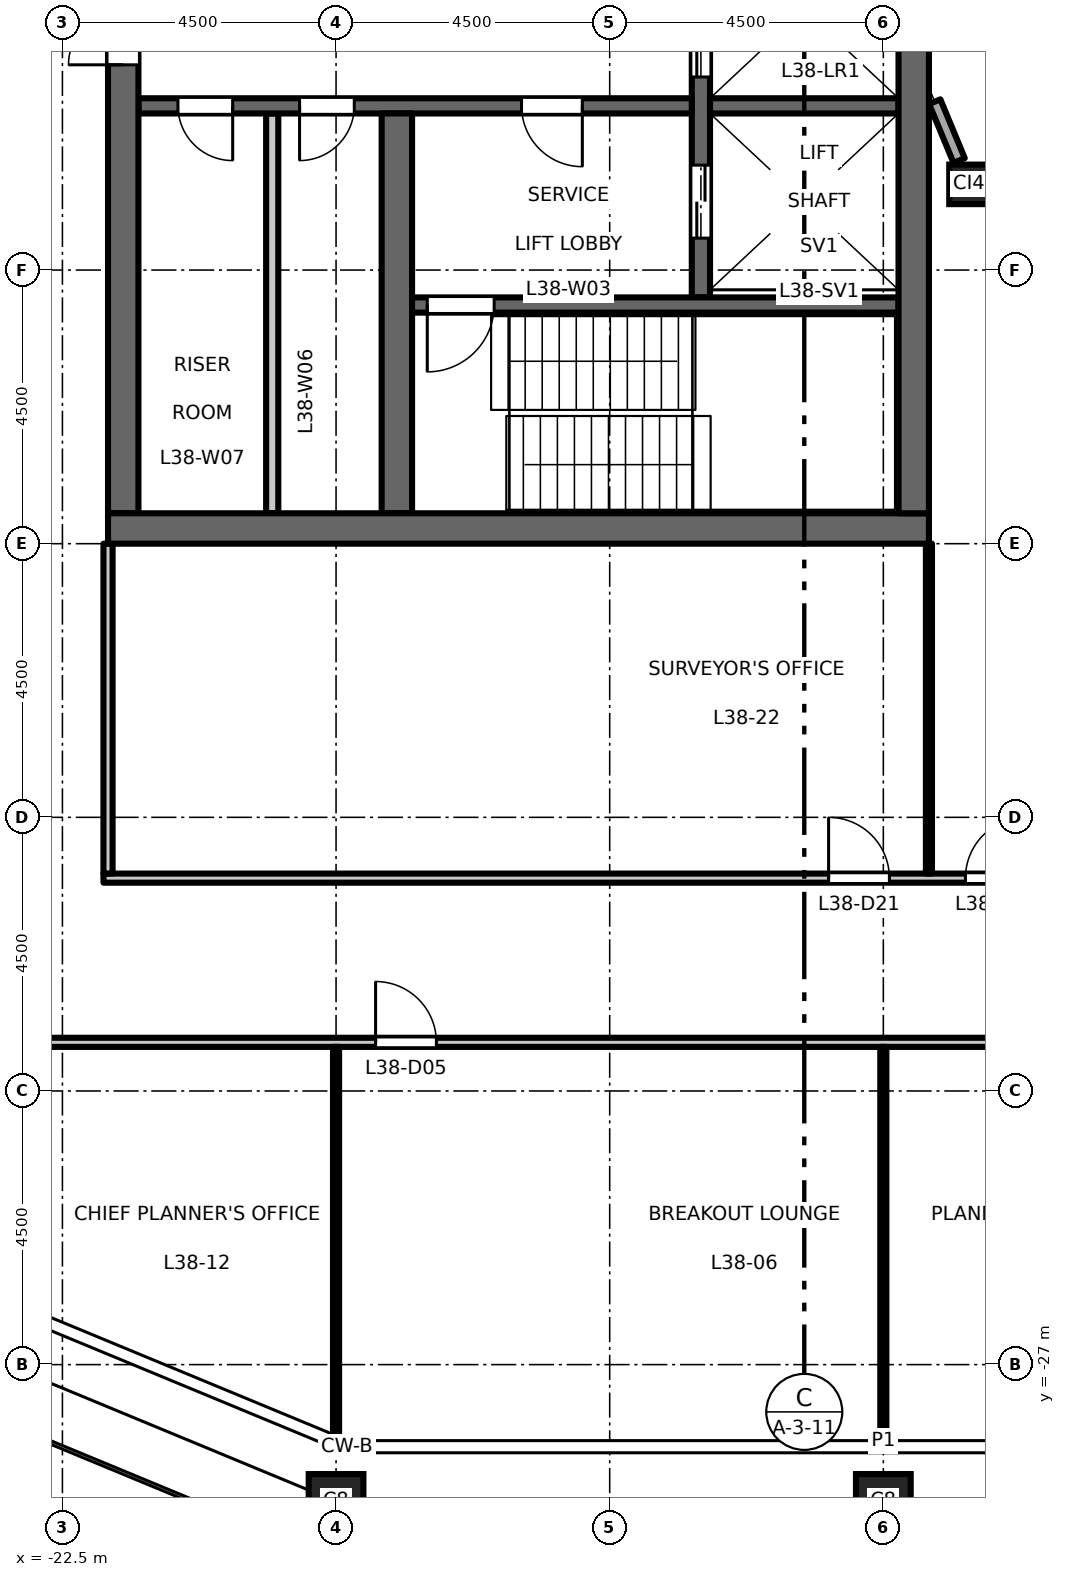
"""IFC4 building model, lengths in metres.
Left out: names, types, materials, properties, quantities, classifications, styles, units other than length and angle.
Written with IfcOpenShell. Run it as: python <this file> out.ifc"""

import sys

from ifc_helpers import new_model, si_unit, direction, frame, frame_2d, origin, origin_2d, place, context, subcontext, project, spatial, rectangle, hollow_rectangle, extrude, element, fill, save


model = new_model("IFC4")
c1 = context("Model", 3, precision=1e-05, world=origin(), true_north=direction((0.0, 1.0)))
c2 = subcontext(c1, "Body", "Model", "MODEL_VIEW")
j1 = project(units=[si_unit("LENGTHUNIT", "METRE"), si_unit("PLANEANGLEUNIT", "RADIAN")], contexts=[c1])
p1 = place(None, origin())
s1 = spatial("IfcSite", under=j1, at=p1, CompositionType="ELEMENT")
p2 = place(p1, origin())
s2 = spatial("IfcBuilding", under=s1, at=p2, CompositionType="ELEMENT")
p3 = place(p2, frame((0.0, 0.0, 176.7)))
s3 = spatial("IfcBuildingStorey", under=s2, at=p3, CompositionType="ELEMENT", Elevation=176.7)
for number, where, z_axis, x_axis in (
    (1, (-18.0, -29.25, 0.0), (0.0, 0.0, 1.0), (1.0, 0.0, 0.0)),
    (2, (-9.0, -29.25, 0.0), (0.0, 0.0, 1.0), (1.0, 0.0, 0.0)),
):
    element("IfcColumn", number, at=place(p3, frame(where, z_axis=z_axis, x_axis=x_axis)), inside=s3, PredefinedType="COLUMN", context=c2, shape_type="SweptSolid", body=[
        extrude(hollow_rectangle(XDim=0.9, YDim=0.9, WallThickness=0.05, at=origin_2d()), origin(), (0.0, 0.0, 1.0), 4.5),
    ])
p4 = place(p3, frame((-7.591, -7.591, 0.0), z_axis=(0.0, 0.0, 1.0), x_axis=(1.0, 0.0, 0.0)))
e3 = element("IfcColumn", 3, at=p4, inside=s3, PredefinedType="COLUMN", context=c2, shape_type="SweptSolid", body=[
    extrude(hollow_rectangle(XDim=0.65, YDim=0.65, WallThickness=0.036, at=origin_2d()), origin(), (0.0, 0.0, 1.0), 4.5),
])
p5 = place(p3, frame((-12.0, -9.45, 0.0), z_axis=(0.0, 0.0, 1.0), x_axis=(0.0, 1.0, 0.0)))
e4 = element("IfcWall", 4, at=p5, inside=s3, PredefinedType="SHEAR", context=c2, shape_type="SweptSolid", body=[
    extrude(rectangle(XDim=18.9, YDim=0.3, at=frame_2d((9.45, 0.0))), origin(), (0.0, 0.0, 1.0), 4.3),
])
p6 = place(p5, frame((3.625, 0.0, 0.0)))
e5 = element("IfcOpeningElement", 5, at=p6, cuts=e4, PredefinedType="OPENING", context=c2, shape_type="SweptSolid", body=[
    extrude(rectangle(XDim=1.1, YDim=2.1, at=frame_2d((0.55, 1.05))), frame((0.0, 0.16, 0.0), z_axis=(0.0, -1.0, 0.0), x_axis=(1.0, 0.0, 0.0)), (0.0, 0.0, 1.0), 0.32),
])
p7 = place(p5, frame((6.775, 0.0, 0.0)))
e6 = element("IfcOpeningElement", 6, at=p7, cuts=e4, PredefinedType="OPENING", context=c2, shape_type="SweptSolid", body=[
    extrude(rectangle(XDim=1.1, YDim=2.1, at=frame_2d((0.55, 1.05))), frame((0.0, 0.16, 0.0), z_axis=(0.0, -1.0, 0.0), x_axis=(1.0, 0.0, 0.0)), (0.0, 0.0, 1.0), 0.32),
])
p8 = place(p5, frame((9.925, 0.0, 0.0)))
e7 = element("IfcOpeningElement", 7, at=p8, cuts=e4, PredefinedType="OPENING", context=c2, shape_type="SweptSolid", body=[
    extrude(rectangle(XDim=1.1, YDim=2.1, at=frame_2d((0.55, 1.05))), frame((0.0, 0.16, 0.0), z_axis=(0.0, -1.0, 0.0), x_axis=(1.0, 0.0, 0.0)), (0.0, 0.0, 1.0), 0.32),
])
p9 = place(p5, frame((13.075, 0.0, 0.0)))
e8 = element("IfcOpeningElement", 8, at=p9, cuts=e4, PredefinedType="OPENING", context=c2, shape_type="SweptSolid", body=[
    extrude(rectangle(XDim=1.1, YDim=2.1, at=frame_2d((0.55, 1.05))), frame((0.0, 0.16, 0.0), z_axis=(0.0, -1.0, 0.0), x_axis=(1.0, 0.0, 0.0)), (0.0, 0.0, 1.0), 0.32),
])
p10 = place(p5, frame((16.725, 0.0, 0.0)))
e9 = element("IfcOpeningElement", 9, at=p10, cuts=e4, PredefinedType="OPENING", context=c2, shape_type="SweptSolid", body=[
    extrude(rectangle(XDim=1.2, YDim=2.1, at=frame_2d((0.6, 1.05))), frame((0.0, 0.16, 0.0), z_axis=(0.0, -1.0, 0.0), x_axis=(1.0, 0.0, 0.0)), (0.0, 0.0, 1.0), 0.32),
])
p11 = place(p5, frame((0.975, 0.0, 0.0)))
e10 = element("IfcOpeningElement", 10, at=p11, cuts=e4, PredefinedType="OPENING", context=c2, shape_type="SweptSolid", body=[
    extrude(rectangle(XDim=1.2, YDim=2.1, at=frame_2d((0.6, 1.05))), frame((0.0, 0.16, 0.0), z_axis=(0.0, -1.0, 0.0), x_axis=(1.0, 0.0, 0.0)), (0.0, 0.0, 1.0), 0.32),
])
p12 = place(p3, frame((-12.15, -6.3, 0.0), z_axis=(0.0, 0.0, 1.0), x_axis=(-1.0, 0.0, 0.0)))
e11 = element("IfcWall", 11, at=p12, inside=s3, PredefinedType="SHEAR", context=c2, shape_type="SweptSolid", body=[
    extrude(rectangle(XDim=9.1, YDim=0.25, at=frame_2d((4.55, 0.0))), origin(), (0.0, 0.0, 1.0), 4.3),
])
p13 = place(p12, frame((1.8, 0.0, 0.0)))
e12 = element("IfcOpeningElement", 12, at=p13, cuts=e11, PredefinedType="OPENING", context=c2, shape_type="SweptSolid", body=[
    extrude(rectangle(XDim=1.0, YDim=2.1, at=frame_2d((0.5, 1.05))), frame((0.0, 0.135, 0.0), z_axis=(0.0, -1.0, 0.0), x_axis=(1.0, 0.0, 0.0)), (0.0, 0.0, 1.0), 0.27),
])
p14 = place(p12, frame((5.55, 0.0, 0.0)))
e13 = element("IfcOpeningElement", 13, at=p14, cuts=e11, PredefinedType="OPENING", context=c2, shape_type="SweptSolid", body=[
    extrude(rectangle(XDim=0.9, YDim=2.1, at=frame_2d((0.45, 1.05))), frame((0.0, 0.135, 0.0), z_axis=(0.0, -1.0, 0.0), x_axis=(1.0, 0.0, 0.0)), (0.0, 0.0, 1.0), 0.27),
])
p15 = place(p12, frame((7.55, 0.0, 0.0)))
e14 = element("IfcOpeningElement", 14, at=p15, cuts=e11, PredefinedType="OPENING", context=c2, shape_type="SweptSolid", body=[
    extrude(rectangle(XDim=0.9, YDim=2.1, at=frame_2d((0.45, 1.05))), frame((0.0, 0.135, 0.0), z_axis=(0.0, -1.0, 0.0), x_axis=(1.0, 0.0, 0.0)), (0.0, 0.0, 1.0), 0.27),
])
p16 = place(p3, frame((-21.5, -13.0, 0.0), z_axis=(0.0, 0.0, 1.0), x_axis=(0.0, 1.0, 0.0)))
e15 = element("IfcWall", 15, at=p16, inside=s3, PredefinedType="SHEAR", context=c2, shape_type="SweptSolid", body=[
    extrude(rectangle(XDim=26.0, YDim=0.5, at=frame_2d((13.0, 0.0))), origin(), (0.0, 0.0, 1.0), 4.3),
])
p17 = place(p16, frame((16.825, 0.0, 0.0)))
e16 = element("IfcOpeningElement", 16, at=p17, cuts=e15, PredefinedType="OPENING", context=c2, shape_type="SweptSolid", body=[
    extrude(rectangle(XDim=1.8, YDim=2.1, at=frame_2d((0.9, 1.05))), frame((0.0, 0.26, 0.0), z_axis=(0.0, -1.0, 0.0), x_axis=(1.0, 0.0, 0.0)), (0.0, 0.0, 1.0), 0.52),
])
p18 = place(p16, frame((7.375, 0.0, 0.0)))
e17 = element("IfcOpeningElement", 17, at=p18, cuts=e15, PredefinedType="OPENING", context=c2, shape_type="SweptSolid", body=[
    extrude(rectangle(XDim=1.8, YDim=2.1, at=frame_2d((0.9, 1.05))), frame((0.0, 0.26, 0.0), z_axis=(0.0, -1.0, 0.0), x_axis=(1.0, 0.0, 0.0)), (0.0, 0.0, 1.0), 0.52),
])
p19 = place(p16, frame((23.8, 0.0, 0.0)))
e18 = element("IfcOpeningElement", 18, at=p19, cuts=e15, PredefinedType="OPENING", context=c2, shape_type="SweptSolid", body=[
    extrude(rectangle(XDim=0.9, YDim=2.1, at=frame_2d((0.45, 1.05))), frame((0.0, 0.26, 0.0), z_axis=(0.0, -1.0, 0.0), x_axis=(1.0, 0.0, 0.0)), (0.0, 0.0, 1.0), 0.52),
])
p20 = place(p3, frame((-19.05, -13.0, 0.0), z_axis=(0.0, 0.0, 1.0), x_axis=(0.0, 1.0, 0.0)))
e19 = element("IfcWall", 19, at=p20, inside=s3, PredefinedType="PARTITIONING", context=c2, shape_type="SweptSolid", body=[
    extrude(rectangle(XDim=6.575, YDim=0.2, at=frame_2d((3.288, 0.0))), origin(), (0.0, 0.0, 1.0), 4.3),
])
p21 = place(p3, frame((-17.0, -13.0, 0.0), z_axis=(0.0, 0.0, 1.0), x_axis=(0.0, 1.0, 0.0)))
e20 = element("IfcWall", 20, at=p21, inside=s3, PredefinedType="SHEAR", context=c2, shape_type="SweptSolid", body=[
    extrude(rectangle(XDim=6.575, YDim=0.5, at=frame_2d((3.288, 0.0))), origin(), (0.0, 0.0, 1.0), 4.3),
])
p22 = place(p3, frame((-8.75, -6.3, 0.0), z_axis=(0.0, 0.0, 1.0), x_axis=(-1.0, 0.0, 0.0)))
e21 = element("IfcWall", 21, at=p22, inside=s3, PredefinedType="SHEAR", context=c2, shape_type="SweptSolid", body=[
    extrude(rectangle(XDim=3.1, YDim=0.25, at=frame_2d((1.55, 0.0))), origin(), (0.0, 0.0, 1.0), 4.3),
])
p23 = place(p3, frame((-8.75, -9.575, 0.0), z_axis=(0.0, 0.0, 1.0), x_axis=(-1.0, 0.0, 0.0)))
e22 = element("IfcWall", 22, at=p23, inside=s3, PredefinedType="SHEAR", context=c2, shape_type="SweptSolid", body=[
    extrude(rectangle(XDim=8.0, YDim=0.25, at=frame_2d((4.0, 0.0))), origin(), (0.0, 0.0, 1.0), 4.3),
])
p24 = place(p23, frame((6.65, 0.0, 0.0)))
e23 = element("IfcOpeningElement", 23, at=p24, cuts=e22, PredefinedType="OPENING", context=c2, shape_type="SweptSolid", body=[
    extrude(rectangle(XDim=1.1, YDim=2.1, at=frame_2d((0.55, 1.05))), frame((0.0, 0.135, 0.0), z_axis=(0.0, -1.0, 0.0), x_axis=(1.0, 0.0, 0.0)), (0.0, 0.0, 1.0), 0.27),
])
p25 = place(p3, frame((-8.25, -13.25, 0.0), z_axis=(0.0, 0.0, 1.0), x_axis=(-1.0, 0.0, 0.0)))
e24 = element("IfcWall", 24, at=p25, inside=s3, PredefinedType="SHEAR", context=c2, shape_type="SweptSolid", body=[
    extrude(rectangle(XDim=13.5, YDim=0.5, at=frame_2d((6.75, 0.0))), origin(), (0.0, 0.0, 1.0), 4.3),
])
p26 = place(p3, frame((-8.5, -13.0, 0.0), z_axis=(0.0, 0.0, 1.0), x_axis=(0.0, 1.0, 0.0)))
e25 = element("IfcWall", 25, at=p26, inside=s3, PredefinedType="SHEAR", context=c2, shape_type="SweptSolid", body=[
    extrude(rectangle(XDim=26.0, YDim=0.5, at=frame_2d((13.0, 0.0))), origin(), (0.0, 0.0, 1.0), 4.3),
])
p27 = place(p3, frame((-8.154, -6.231, 0.0), z_axis=(0.0, 0.0, 1.0), x_axis=(0.382694858887, -0.923874799408, 0.0)))
e26 = element("IfcWall", 26, at=p27, inside=s3, PredefinedType="STANDARD", context=c2, shape_type="SweptSolid", body=[
    extrude(rectangle(XDim=1.048, YDim=0.2, at=frame_2d((0.524, 0.0))), origin(), (0.0, 0.0, 1.0), 3.776),
])
p28 = place(p3, frame((-26.646, -21.7, 0.0), z_axis=(0.0, 0.0, 1.0), x_axis=(1.0, 0.0, 0.0)))
e27 = element("IfcWall", 27, at=p28, inside=s3, PredefinedType="PARTITIONING", context=c2, shape_type="SweptSolid", body=[
    extrude(rectangle(XDim=53.292, YDim=0.15, at=frame_2d((26.646, 0.0))), origin(), (0.0, 0.0, 1.0), 4.3),
])
p29 = place(p28, frame((9.296, 0.0, 0.0)))
e28 = element("IfcOpeningElement", 28, at=p29, cuts=e27, PredefinedType="OPENING", context=c2, shape_type="SweptSolid", body=[
    extrude(rectangle(XDim=1.0, YDim=2.1, at=frame_2d((0.5, 1.05))), frame((0.0, 0.085, 0.0), z_axis=(0.0, -1.0, 0.0), x_axis=(1.0, 0.0, 0.0)), (0.0, 0.0, 1.0), 0.17),
])
p30 = place(p28, frame((25.046, 0.0, 0.0)))
e29 = element("IfcOpeningElement", 29, at=p30, cuts=e27, PredefinedType="OPENING", context=c2, shape_type="SweptSolid", body=[
    extrude(rectangle(XDim=1.0, YDim=2.1, at=frame_2d((0.5, 1.05))), frame((0.0, 0.085, 0.0), z_axis=(0.0, -1.0, 0.0), x_axis=(1.0, 0.0, 0.0)), (0.0, 0.0, 1.0), 0.17),
])
p31 = place(p28, frame((27.296, 0.0, 0.0)))
e30 = element("IfcOpeningElement", 30, at=p31, cuts=e27, PredefinedType="OPENING", context=c2, shape_type="SweptSolid", body=[
    extrude(rectangle(XDim=1.0, YDim=2.1, at=frame_2d((0.5, 1.05))), frame((0.0, 0.085, 0.0), z_axis=(0.0, -1.0, 0.0), x_axis=(1.0, 0.0, 0.0)), (0.0, 0.0, 1.0), 0.17),
])
p32 = place(p28, frame((43.046, 0.0, 0.0)))
e31 = element("IfcOpeningElement", 31, at=p32, cuts=e27, PredefinedType="OPENING", context=c2, shape_type="SweptSolid", body=[
    extrude(rectangle(XDim=1.0, YDim=2.1, at=frame_2d((0.5, 1.05))), frame((0.0, 0.085, 0.0), z_axis=(0.0, -1.0, 0.0), x_axis=(1.0, 0.0, 0.0)), (0.0, 0.0, 1.0), 0.17),
])
p33 = place(p28, frame((0.65, 0.0, 0.0)))
e32 = element("IfcOpeningElement", 32, at=p33, cuts=e27, PredefinedType="OPENING", context=c2, shape_type="SweptSolid", body=[
    extrude(rectangle(XDim=1.0, YDim=2.1, at=frame_2d((0.5, 1.05))), frame((0.0, 0.085, 0.0), z_axis=(0.0, -1.0, 0.0), x_axis=(1.0, 0.0, 0.0)), (0.0, 0.0, 1.0), 0.17),
])
p34 = place(p28, frame((51.546, 0.0, 0.0)))
e33 = element("IfcOpeningElement", 33, at=p34, cuts=e27, PredefinedType="OPENING", context=c2, shape_type="SweptSolid", body=[
    extrude(rectangle(XDim=1.0, YDim=2.1, at=frame_2d((0.5, 1.05))), frame((0.0, 0.085, 0.0), z_axis=(0.0, -1.0, 0.0), x_axis=(1.0, 0.0, 0.0)), (0.0, 0.0, 1.0), 0.17),
])
p35 = place(p3, frame((-21.825, -19.0, 0.0), z_axis=(0.0, 0.0, 1.0), x_axis=(1.0, 0.0, 0.0)))
e34 = element("IfcWall", 34, at=p35, inside=s3, PredefinedType="PARTITIONING", context=c2, shape_type="SweptSolid", body=[
    extrude(rectangle(XDim=43.65, YDim=0.15, at=frame_2d((21.825, 0.0))), origin(), (0.0, 0.0, 1.0), 4.3),
])
p36 = place(p35, frame((14.175, 0.0, 0.0)))
e35 = element("IfcOpeningElement", 35, at=p36, cuts=e34, PredefinedType="OPENING", context=c2, shape_type="SweptSolid", body=[
    extrude(rectangle(XDim=1.0, YDim=2.1, at=frame_2d((0.5, 1.05))), frame((0.0, 0.085, 0.0), z_axis=(0.0, -1.0, 0.0), x_axis=(1.0, 0.0, 0.0)), (0.0, 0.0, 1.0), 0.17),
])
p37 = place(p35, frame((11.925, 0.0, 0.0)))
e36 = element("IfcOpeningElement", 36, at=p37, cuts=e34, PredefinedType="OPENING", context=c2, shape_type="SweptSolid", body=[
    extrude(rectangle(XDim=1.0, YDim=2.1, at=frame_2d((0.5, 1.05))), frame((0.0, 0.085, 0.0), z_axis=(0.0, -1.0, 0.0), x_axis=(1.0, 0.0, 0.0)), (0.0, 0.0, 1.0), 0.17),
])
p38 = place(p35, frame((30.675, 0.0, 0.0)))
e37 = element("IfcOpeningElement", 37, at=p38, cuts=e34, PredefinedType="OPENING", context=c2, shape_type="SweptSolid", body=[
    extrude(rectangle(XDim=1.0, YDim=2.1, at=frame_2d((0.5, 1.05))), frame((0.0, 0.085, 0.0), z_axis=(0.0, -1.0, 0.0), x_axis=(1.0, 0.0, 0.0)), (0.0, 0.0, 1.0), 0.17),
])
p39 = place(p3, frame((-21.75, -18.925, 0.0), z_axis=(0.0, 0.0, 1.0), x_axis=(0.0, 1.0, 0.0)))
e38 = element("IfcWall", 38, at=p39, inside=s3, PredefinedType="PARTITIONING", context=c2, shape_type="SweptSolid", body=[
    extrude(rectangle(XDim=5.425, YDim=0.15, at=frame_2d((2.712, 0.0))), origin(), (0.0, 0.0, 1.0), 4.3),
])
p40 = place(p3, frame((-18.0, -28.178, 0.0), z_axis=(0.0, 0.0, 1.0), x_axis=(0.0, 1.0, 0.0)))
e39 = element("IfcWall", 39, at=p40, inside=s3, PredefinedType="PARTITIONING", context=c2, shape_type="SweptSolid", body=[
    extrude(rectangle(XDim=6.403, YDim=0.1, at=frame_2d((3.202, 0.0))), origin(), (0.0, 0.0, 1.0), 3.4),
])
p41 = place(p3, frame((-9.0, -28.26, 0.0), z_axis=(0.0, 0.0, 1.0), x_axis=(0.0, 1.0, 0.0)))
e40 = element("IfcWall", 40, at=p41, inside=s3, PredefinedType="PARTITIONING", context=c2, shape_type="SweptSolid", body=[
    extrude(rectangle(XDim=6.485, YDim=0.1, at=frame_2d((3.243, 0.0))), origin(), (0.0, 0.0, 1.0), 3.4),
])
p42 = place(p3, frame((-8.25, -18.925, 0.0), z_axis=(0.0, 0.0, 1.0), x_axis=(0.0, 1.0, 0.0)))
e41 = element("IfcWall", 41, at=p42, inside=s3, PredefinedType="PARTITIONING", context=c2, shape_type="SweptSolid", body=[
    extrude(rectangle(XDim=5.425, YDim=0.1, at=frame_2d((2.712, 0.0))), origin(), (0.0, 0.0, 1.0), 4.3),
])
p43 = place(p13, origin())
e42 = element("IfcDoor", 42, at=p43, inside=s3, OperationType="SINGLE_SWING_RIGHT", PredefinedType="DOOR", context=c2, shape_type="SweptSolid", body=[
    extrude(rectangle(XDim=1.0, YDim=2.1, at=frame_2d((0.5, 1.05))), frame((0.0, 0.025, 0.0), z_axis=(0.0, -1.0, 0.0), x_axis=(1.0, 0.0, 0.0)), (0.0, 0.0, 1.0), 0.05),
])
fill(e12, e42)
p44 = place(p24, origin())
e43 = element("IfcDoor", 43, at=p44, inside=s3, OperationType="SINGLE_SWING_LEFT", PredefinedType="DOOR", context=c2, shape_type="SweptSolid", body=[
    extrude(rectangle(XDim=1.1, YDim=2.1, at=frame_2d((0.55, 1.05))), frame((0.0, 0.025, 0.0), z_axis=(0.0, -1.0, 0.0), x_axis=(1.0, 0.0, 0.0)), (0.0, 0.0, 1.0), 0.05),
])
fill(e23, e43)
p45 = place(p18, origin())
e44 = element("IfcDoor", 44, at=p45, inside=s3, OperationType="DOUBLE_DOOR_DOUBLE_SWING", PredefinedType="DOOR", context=c2, shape_type="SweptSolid", body=[
    extrude(rectangle(XDim=1.8, YDim=2.1, at=frame_2d((0.9, 1.05))), frame((0.0, 0.025, 0.0), z_axis=(0.0, -1.0, 0.0), x_axis=(1.0, 0.0, 0.0)), (0.0, 0.0, 1.0), 0.05),
])
fill(e17, e44)
p46 = place(p6, origin())
e45 = element("IfcDoor", 45, at=p46, inside=s3, OperationType="DOUBLE_DOOR_SLIDING", PredefinedType="DOOR", context=c2, shape_type="SweptSolid", body=[
    extrude(rectangle(XDim=1.1, YDim=2.1, at=frame_2d((0.55, 1.05))), frame((0.0, 0.025, 0.0), z_axis=(0.0, -1.0, 0.0), x_axis=(1.0, 0.0, 0.0)), (0.0, 0.0, 1.0), 0.05),
])
fill(e5, e45)
p47 = place(p11, origin())
e46 = element("IfcDoor", 46, at=p47, inside=s3, OperationType="DOUBLE_DOOR_SLIDING", PredefinedType="DOOR", context=c2, shape_type="SweptSolid", body=[
    extrude(rectangle(XDim=1.2, YDim=2.1, at=frame_2d((0.6, 1.05))), frame((0.0, 0.025, 0.0), z_axis=(0.0, -1.0, 0.0), x_axis=(1.0, 0.0, 0.0)), (0.0, 0.0, 1.0), 0.05),
])
fill(e10, e46)
p48 = place(p14, origin())
e47 = element("IfcDoor", 47, at=p48, inside=s3, OperationType="SINGLE_SWING_LEFT", PredefinedType="DOOR", context=c2, shape_type="SweptSolid", body=[
    extrude(rectangle(XDim=0.9, YDim=2.1, at=frame_2d((0.45, 1.05))), frame((0.0, 0.025, 0.0), z_axis=(0.0, -1.0, 0.0), x_axis=(1.0, 0.0, 0.0)), (0.0, 0.0, 1.0), 0.05),
])
fill(e13, e47)
p49 = place(p15, origin())
e48 = element("IfcDoor", 48, at=p49, inside=s3, OperationType="SINGLE_SWING_RIGHT", PredefinedType="DOOR", context=c2, shape_type="SweptSolid", body=[
    extrude(rectangle(XDim=0.9, YDim=2.1, at=frame_2d((0.45, 1.05))), frame((0.0, 0.025, 0.0), z_axis=(0.0, -1.0, 0.0), x_axis=(1.0, 0.0, 0.0)), (0.0, 0.0, 1.0), 0.05),
])
fill(e14, e48)
p50 = place(p29, origin())
e49 = element("IfcDoor", 49, at=p50, inside=s3, OperationType="SINGLE_SWING_LEFT", PredefinedType="DOOR", context=c2, shape_type="SweptSolid", body=[
    extrude(rectangle(XDim=1.0, YDim=2.1, at=frame_2d((0.5, 1.05))), frame((0.0, 0.025, 0.0), z_axis=(0.0, -1.0, 0.0), x_axis=(1.0, 0.0, 0.0)), (0.0, 0.0, 1.0), 0.05),
])
fill(e28, e49)
p51 = place(p36, origin())
e50 = element("IfcDoor", 50, at=p51, inside=s3, OperationType="SINGLE_SWING_RIGHT", PredefinedType="DOOR", context=c2, shape_type="SweptSolid", body=[
    extrude(rectangle(XDim=1.0, YDim=2.1, at=frame_2d((0.5, 1.05))), frame((0.0, 0.025, 0.0), z_axis=(0.0, -1.0, 0.0), x_axis=(1.0, 0.0, 0.0)), (0.0, 0.0, 1.0), 0.05),
])
fill(e35, e50)
p52 = place(p37, origin())
e51 = element("IfcDoor", 51, at=p52, inside=s3, OperationType="SINGLE_SWING_LEFT", PredefinedType="DOOR", context=c2, shape_type="SweptSolid", body=[
    extrude(rectangle(XDim=1.0, YDim=2.1, at=frame_2d((0.5, 1.05))), frame((0.0, 0.025, 0.0), z_axis=(0.0, -1.0, 0.0), x_axis=(1.0, 0.0, 0.0)), (0.0, 0.0, 1.0), 0.05),
])
fill(e36, e51)
save(model, sys.argv[1])
